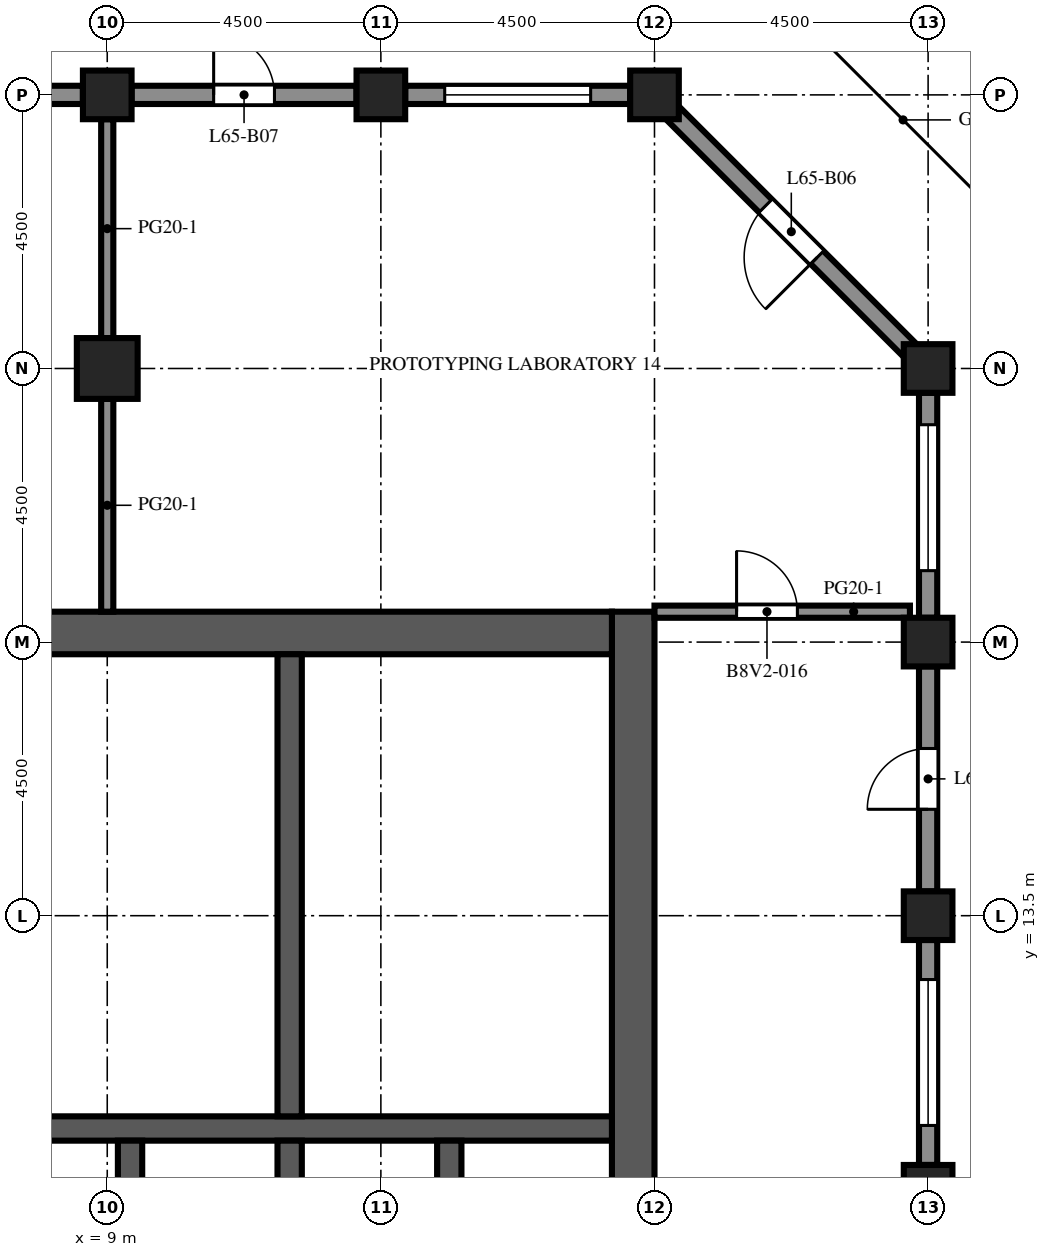
"""IFC4 building model, lengths in metres.
Left out: names, types, materials, properties, quantities, classifications, styles, units other than length and angle.
Written with IfcOpenShell. Run it as: python <this file> out.ifc"""

import sys

from ifc_helpers import new_model, si_unit, direction, frame, frame_2d, origin, origin_2d, place, context, subcontext, project, spatial, rectangle, extrude, element, fill, save


model = new_model("IFC4")
c1 = context("Model", 3, precision=1e-05, world=origin(), true_north=direction((0.0, 1.0)))
c2 = subcontext(c1, "Body", "Model", "MODEL_VIEW")
j1 = project(units=[si_unit("LENGTHUNIT", "METRE"), si_unit("PLANEANGLEUNIT", "RADIAN")], contexts=[c1])
p1 = place(None, origin())
s1 = spatial("IfcSite", under=j1, at=p1, CompositionType="ELEMENT")
p2 = place(p1, origin())
s2 = spatial("IfcBuilding", under=s1, at=p2, CompositionType="ELEMENT")
p3 = place(p2, frame((0.0, 0.0, 286.8)))
s3 = spatial("IfcBuildingStorey", under=s2, at=p3, CompositionType="ELEMENT", Elevation=286.8)
for number, where, z_axis, x_axis in (
    (1, (9.0, 27.0, 0.0), (0.0, 0.0, 1.0), (1.0, 0.0, 0.0)),
    (2, (13.5, 27.0, 0.0), (0.0, 0.0, 1.0), (1.0, 0.0, 0.0)),
    (3, (18.0, 27.0, 0.0), (0.0, 0.0, 1.0), (1.0, 0.0, 0.0)),
    (4, (22.5, 9.0, 0.0), (0.0, 0.0, 1.0), (1.0, 0.0, 0.0)),
    (5, (22.5, 13.5, 0.0), (0.0, 0.0, 1.0), (1.0, 0.0, 0.0)),
    (6, (22.5, 18.0, 0.0), (0.0, 0.0, 1.0), (1.0, 0.0, 0.0)),
    (7, (22.5, 22.5, 0.0), (0.0, 0.0, 1.0), (1.0, 0.0, 0.0)),
):
    element("IfcColumn", number, at=place(p3, frame(where, z_axis=z_axis, x_axis=x_axis)), inside=s3, PredefinedType="COLUMN", context=c2, shape_type="SweptSolid", body=[
        extrude(rectangle(XDim=0.8, YDim=0.8, at=origin_2d()), origin(), (0.0, 0.0, 1.0), 4.1),
    ])
p4 = place(p3, frame((9.0, 22.5, 0.0), z_axis=(0.0, 0.0, 1.0), x_axis=(1.0, 0.0, 0.0)))
e8 = element("IfcColumn", 8, at=p4, inside=s3, PredefinedType="COLUMN", context=c2, shape_type="SweptSolid", body=[
    extrude(rectangle(XDim=1.0, YDim=1.0, at=origin_2d()), origin(), (0.0, 0.0, 1.0), 4.1),
])
p5 = place(p3, frame((17.65, -9.0, 0.0), z_axis=(0.0, 0.0, 1.0), x_axis=(0.0, 1.0, 0.0)))
e9 = element("IfcWall", 9, at=p5, inside=s3, PredefinedType="SHEAR", context=c2, shape_type="SweptSolid", body=[
    extrude(rectangle(XDim=27.5, YDim=0.7, at=frame_2d((13.75, 0.0))), origin(), (0.0, 0.0, 1.0), 4.1),
])
p6 = place(p5, frame((12.55, 0.0, 0.0)))
e10 = element("IfcOpeningElement", 10, at=p6, cuts=e9, PredefinedType="OPENING", context=c2, shape_type="SweptSolid", body=[
    extrude(rectangle(XDim=2.4, YDim=2.4, at=frame_2d((1.2, 1.2))), frame((0.0, 0.36, 0.0), z_axis=(0.0, -1.0, 0.0), x_axis=(1.0, 0.0, 0.0)), (0.0, 0.0, 1.0), 0.72),
])
p7 = place(p5, frame((6.825, 0.0, 0.0)))
e11 = element("IfcOpeningElement", 11, at=p7, cuts=e9, PredefinedType="OPENING", context=c2, shape_type="SweptSolid", body=[
    extrude(rectangle(XDim=1.2, YDim=2.1, at=frame_2d((0.6, 1.05))), frame((0.0, 0.36, 0.0), z_axis=(0.0, -1.0, 0.0), x_axis=(1.0, 0.0, 0.0)), (0.0, 0.0, 1.0), 0.72),
])
p8 = place(p5, frame((19.475, 0.0, 0.0)))
e12 = element("IfcOpeningElement", 12, at=p8, cuts=e9, PredefinedType="OPENING", context=c2, shape_type="SweptSolid", body=[
    extrude(rectangle(XDim=1.2, YDim=2.1, at=frame_2d((0.6, 1.05))), frame((0.0, 0.36, 0.0), z_axis=(0.0, -1.0, 0.0), x_axis=(1.0, 0.0, 0.0)), (0.0, 0.0, 1.0), 0.72),
])
p9 = place(p3, frame((6.7, 18.15, 0.0), z_axis=(0.0, 0.0, 1.0), x_axis=(1.0, 0.0, 0.0)))
e13 = element("IfcWall", 13, at=p9, inside=s3, PredefinedType="SHEAR", context=c2, shape_type="SweptSolid", body=[
    extrude(rectangle(XDim=10.6, YDim=0.7, at=frame_2d((5.3, 0.0))), origin(), (0.0, 0.0, 1.0), 4.1),
])
p10 = place(p3, frame((6.7, 10.0, 0.0), z_axis=(0.0, 0.0, 1.0), x_axis=(1.0, 0.0, 0.0)))
e14 = element("IfcWall", 14, at=p10, inside=s3, PredefinedType="SHEAR", context=c2, shape_type="SweptSolid", body=[
    extrude(rectangle(XDim=10.6, YDim=0.4, at=frame_2d((5.3, 0.0))), origin(), (0.0, 0.0, 1.0), 4.1),
])
for number, where, z_axis, x_axis in (
    (15, (9.375, 6.9, 0.0), (0.0, 0.0, 1.0), (0.0, 1.0, 0.0)),
    (16, (12.0, 6.9, 0.0), (0.0, 0.0, 1.0), (0.0, 1.0, 0.0)),
    (17, (14.625, 6.9, 0.0), (0.0, 0.0, 1.0), (0.0, 1.0, 0.0)),
):
    element("IfcWall", number, at=place(p3, frame(where, z_axis=z_axis, x_axis=x_axis)), inside=s3, PredefinedType="SHEAR", context=c2, shape_type="SweptSolid", body=[
        extrude(rectangle(XDim=2.9, YDim=0.4, at=frame_2d((1.45, 0.0))), origin(), (0.0, 0.0, 1.0), 4.1),
    ])
p11 = place(p3, frame((12.0, 10.2, 0.0), z_axis=(0.0, 0.0, 1.0), x_axis=(0.0, 1.0, 0.0)))
e18 = element("IfcWall", 18, at=p11, inside=s3, PredefinedType="SHEAR", context=c2, shape_type="SweptSolid", body=[
    extrude(rectangle(XDim=7.6, YDim=0.4, at=frame_2d((3.8, 0.0))), origin(), (0.0, 0.0, 1.0), 4.1),
])
p12 = place(p3, frame((22.5, 13.1, 0.0), z_axis=(0.0, 0.0, 1.0), x_axis=(0.0, -1.0, 0.0)))
e19 = element("IfcWall", 19, at=p12, inside=s3, PredefinedType="SOLIDWALL", context=c2, shape_type="SweptSolid", body=[
    extrude(rectangle(XDim=3.7, YDim=0.3, at=frame_2d((1.85, 0.0))), origin(), (0.0, 0.0, 1.0), 2.85),
])
p13 = place(p12, frame((0.65, 0.0, 0.8)))
e20 = element("IfcOpeningElement", 20, at=p13, cuts=e19, PredefinedType="OPENING", context=c2, shape_type="SweptSolid", body=[
    extrude(rectangle(XDim=2.4, YDim=1.7, at=frame_2d((1.2, 0.85))), frame((0.0, 0.16, 0.0), z_axis=(0.0, -1.0, 0.0), x_axis=(1.0, 0.0, 0.0)), (0.0, 0.0, 1.0), 0.32),
])
p14 = place(p3, frame((22.5, 17.6, 0.0), z_axis=(0.0, 0.0, 1.0), x_axis=(0.0, -1.0, 0.0)))
e21 = element("IfcWall", 21, at=p14, inside=s3, PredefinedType="SOLIDWALL", context=c2, shape_type="SweptSolid", body=[
    extrude(rectangle(XDim=3.7, YDim=0.3, at=frame_2d((1.85, 0.0))), origin(), (0.0, 0.0, 1.0), 2.85),
])
p15 = place(p14, frame((1.35, 0.0, 0.0)))
e22 = element("IfcOpeningElement", 22, at=p15, cuts=e21, PredefinedType="OPENING", context=c2, shape_type="SweptSolid", body=[
    extrude(rectangle(XDim=1.0, YDim=2.2, at=frame_2d((0.5, 1.1))), frame((0.0, 0.16, 0.0), z_axis=(0.0, -1.0, 0.0), x_axis=(1.0, 0.0, 0.0)), (0.0, 0.0, 1.0), 0.32),
])
p16 = place(p3, frame((22.5, 22.1, 0.0), z_axis=(0.0, 0.0, 1.0), x_axis=(0.0, -1.0, 0.0)))
e23 = element("IfcWall", 23, at=p16, inside=s3, PredefinedType="SOLIDWALL", context=c2, shape_type="SweptSolid", body=[
    extrude(rectangle(XDim=3.7, YDim=0.3, at=frame_2d((1.85, 0.0))), origin(), (0.0, 0.0, 1.0), 2.85),
])
p17 = place(p16, frame((0.525, 0.0, 0.8)))
e24 = element("IfcOpeningElement", 24, at=p17, cuts=e23, PredefinedType="OPENING", context=c2, shape_type="SweptSolid", body=[
    extrude(rectangle(XDim=2.4, YDim=1.7, at=frame_2d((1.2, 0.85))), frame((0.0, 0.16, 0.0), z_axis=(0.0, -1.0, 0.0), x_axis=(1.0, 0.0, 0.0)), (0.0, 0.0, 1.0), 0.32),
])
p18 = place(p3, frame((18.294, 26.706, 0.0), z_axis=(0.0, 0.0, 1.0), x_axis=(0.707106781187, -0.707106781187, 0.0)))
e25 = element("IfcWall", 25, at=p18, inside=s3, PredefinedType="SOLIDWALL", context=c2, shape_type="SweptSolid", body=[
    extrude(rectangle(XDim=5.532, YDim=0.3, at=frame_2d((2.766, 0.0))), origin(), (0.0, 0.0, 1.0), 2.85),
])
p19 = place(p18, frame((2.166, 0.0, 0.0)))
e26 = element("IfcOpeningElement", 26, at=p19, cuts=e25, PredefinedType="OPENING", context=c2, shape_type="SweptSolid", body=[
    extrude(rectangle(XDim=1.2, YDim=2.2, at=frame_2d((0.6, 1.1))), frame((0.0, 0.16, 0.0), z_axis=(0.0, -1.0, 0.0), x_axis=(1.0, 0.0, 0.0)), (0.0, 0.0, 1.0), 0.32),
])
p20 = place(p3, frame((13.9, 27.0, 0.0), z_axis=(0.0, 0.0, 1.0), x_axis=(1.0, 0.0, 0.0)))
e27 = element("IfcWall", 27, at=p20, inside=s3, PredefinedType="SOLIDWALL", context=c2, shape_type="SweptSolid", body=[
    extrude(rectangle(XDim=3.7, YDim=0.3, at=frame_2d((1.85, 0.0))), origin(), (0.0, 0.0, 1.0), 2.85),
])
p21 = place(p20, frame((0.65, 0.0, 0.8)))
e28 = element("IfcOpeningElement", 28, at=p21, cuts=e27, PredefinedType="OPENING", context=c2, shape_type="SweptSolid", body=[
    extrude(rectangle(XDim=2.4, YDim=1.7, at=frame_2d((1.2, 0.85))), frame((0.0, 0.16, 0.0), z_axis=(0.0, -1.0, 0.0), x_axis=(1.0, 0.0, 0.0)), (0.0, 0.0, 1.0), 0.32),
])
p22 = place(p3, frame((9.4, 27.0, 0.0), z_axis=(0.0, 0.0, 1.0), x_axis=(1.0, 0.0, 0.0)))
e29 = element("IfcWall", 29, at=p22, inside=s3, PredefinedType="SOLIDWALL", context=c2, shape_type="SweptSolid", body=[
    extrude(rectangle(XDim=3.7, YDim=0.3, at=frame_2d((1.85, 0.0))), origin(), (0.0, 0.0, 1.0), 2.85),
])
p23 = place(p22, frame((1.35, 0.0, 0.0)))
e30 = element("IfcOpeningElement", 30, at=p23, cuts=e29, PredefinedType="OPENING", context=c2, shape_type="SweptSolid", body=[
    extrude(rectangle(XDim=1.0, YDim=2.2, at=frame_2d((0.5, 1.1))), frame((0.0, 0.16, 0.0), z_axis=(0.0, -1.0, 0.0), x_axis=(1.0, 0.0, 0.0)), (0.0, 0.0, 1.0), 0.32),
])
p24 = place(p3, frame((4.9, 27.0, 0.0), z_axis=(0.0, 0.0, 1.0), x_axis=(1.0, 0.0, 0.0)))
e31 = element("IfcWall", 31, at=p24, inside=s3, PredefinedType="SOLIDWALL", context=c2, shape_type="SweptSolid", body=[
    extrude(rectangle(XDim=3.7, YDim=0.3, at=frame_2d((1.85, 0.0))), origin(), (0.0, 0.0, 1.0), 2.85),
])
p25 = place(p24, frame((0.65, 0.0, 0.8)))
e32 = element("IfcOpeningElement", 32, at=p25, cuts=e31, PredefinedType="OPENING", context=c2, shape_type="SweptSolid", body=[
    extrude(rectangle(XDim=2.4, YDim=1.7, at=frame_2d((1.2, 0.85))), frame((0.0, 0.16, 0.0), z_axis=(0.0, -1.0, 0.0), x_axis=(1.0, 0.0, 0.0)), (0.0, 0.0, 1.0), 0.32),
])
p26 = place(p3, frame((8.1, 10.2, 0.0), z_axis=(0.0, 0.0, 1.0), x_axis=(0.0, 1.0, 0.0)))
e33 = element("IfcWall", 33, at=p26, inside=s3, PredefinedType="PARTITIONING", context=c2, shape_type="SweptSolid", body=[
    extrude(rectangle(XDim=2.28, YDim=0.1, at=frame_2d((1.14, 0.0))), origin(), (0.0, 0.0, 1.0), 3.65),
])
p27 = place(p26, frame((0.64, 0.0, 0.0)))
e34 = element("IfcOpeningElement", 34, at=p27, cuts=e33, PredefinedType="OPENING", context=c2, shape_type="SweptSolid", body=[
    extrude(rectangle(XDim=1.0, YDim=2.1, at=frame_2d((0.5, 1.05))), frame((0.0, 0.06, 0.0), z_axis=(0.0, -1.0, 0.0), x_axis=(1.0, 0.0, 0.0)), (0.0, 0.0, 1.0), 0.12),
])
p28 = place(p3, frame((8.1, 12.48, 0.0), z_axis=(0.0, 0.0, 1.0), x_axis=(0.0, 1.0, 0.0)))
e35 = element("IfcWall", 35, at=p28, inside=s3, PredefinedType="PARTITIONING", context=c2, shape_type="SweptSolid", body=[
    extrude(rectangle(XDim=2.432, YDim=0.1, at=frame_2d((1.216, 0.0))), origin(), (0.0, 0.0, 1.0), 3.65),
])
p29 = place(p28, frame((0.716, 0.0, 0.0)))
e36 = element("IfcOpeningElement", 36, at=p29, cuts=e35, PredefinedType="OPENING", context=c2, shape_type="SweptSolid", body=[
    extrude(rectangle(XDim=1.0, YDim=2.1, at=frame_2d((0.5, 1.05))), frame((0.0, 0.06, 0.0), z_axis=(0.0, -1.0, 0.0), x_axis=(1.0, 0.0, 0.0)), (0.0, 0.0, 1.0), 0.12),
])
p30 = place(p3, frame((8.1, 14.912, 0.0), z_axis=(0.0, 0.0, 1.0), x_axis=(0.0, 1.0, 0.0)))
e37 = element("IfcWall", 37, at=p30, inside=s3, PredefinedType="PARTITIONING", context=c2, shape_type="SweptSolid", body=[
    extrude(rectangle(XDim=2.888, YDim=0.1, at=frame_2d((1.444, 0.0))), origin(), (0.0, 0.0, 1.0), 3.65),
])
p31 = place(p30, frame((0.944, 0.0, 0.0)))
e38 = element("IfcOpeningElement", 38, at=p31, cuts=e37, PredefinedType="OPENING", context=c2, shape_type="SweptSolid", body=[
    extrude(rectangle(XDim=1.0, YDim=2.1, at=frame_2d((0.5, 1.05))), frame((0.0, 0.06, 0.0), z_axis=(0.0, -1.0, 0.0), x_axis=(1.0, 0.0, 0.0)), (0.0, 0.0, 1.0), 0.12),
])
for number, where, z_axis, x_axis in (
    (39, (8.1, 12.48, 0.0), (0.0, 0.0, 1.0), (1.0, 0.0, 0.0)),
    (40, (8.1, 14.912, 0.0), (0.0, 0.0, 1.0), (1.0, 0.0, 0.0)),
):
    element("IfcWall", number, at=place(p3, frame(where, z_axis=z_axis, x_axis=x_axis)), inside=s3, PredefinedType="PARTITIONING", context=c2, shape_type="SweptSolid", body=[
        extrude(rectangle(XDim=3.7, YDim=0.1, at=frame_2d((1.85, 0.0))), origin(), (0.0, 0.0, 1.0), 3.65),
    ])
p32 = place(p3, frame((9.0, 18.5, 0.0), z_axis=(0.0, 0.0, 1.0), x_axis=(0.0, 1.0, 0.0)))
e41 = element("IfcWall", 41, at=p32, inside=s3, PredefinedType="PARTITIONING", context=c2, shape_type="SweptSolid", body=[
    extrude(rectangle(XDim=3.5, YDim=0.2, at=frame_2d((1.75, 0.0))), origin(), (0.0, 0.0, 1.0), 3.65),
])
p33 = place(p3, frame((9.0, 23.0, 0.0), z_axis=(0.0, 0.0, 1.0), x_axis=(0.0, 1.0, 0.0)))
e42 = element("IfcWall", 42, at=p33, inside=s3, PredefinedType="PARTITIONING", context=c2, shape_type="SweptSolid", body=[
    extrude(rectangle(XDim=3.6, YDim=0.2, at=frame_2d((1.8, 0.0))), origin(), (0.0, 0.0, 1.0), 3.65),
])
p34 = place(p3, frame((18.0, 18.5, 0.0), z_axis=(0.0, 0.0, 1.0), x_axis=(1.0, 0.0, 0.0)))
e43 = element("IfcWall", 43, at=p34, inside=s3, PredefinedType="PARTITIONING", context=c2, shape_type="SweptSolid", body=[
    extrude(rectangle(XDim=4.201, YDim=0.2, at=frame_2d((2.101, 0.0))), origin(), (0.0, 0.0, 1.0), 3.65),
])
p35 = place(p34, frame((1.35, 0.0, 0.0)))
e44 = element("IfcOpeningElement", 44, at=p35, cuts=e43, PredefinedType="OPENING", context=c2, shape_type="SweptSolid", body=[
    extrude(rectangle(XDim=1.0, YDim=2.1, at=frame_2d((0.5, 1.05))), frame((0.0, 0.11, 0.0), z_axis=(0.0, -1.0, 0.0), x_axis=(1.0, 0.0, 0.0)), (0.0, 0.0, 1.0), 0.22),
])
p36 = place(p13, origin())
e45 = element("IfcWindow", 45, at=p36, inside=s3, PartitioningType="SINGLE_PANEL", PredefinedType="WINDOW", context=c2, shape_type="SweptSolid", body=[
    extrude(rectangle(XDim=2.4, YDim=1.7, at=frame_2d((1.2, 0.85))), frame((0.0, 0.03, 0.0), z_axis=(0.0, -1.0, 0.0), x_axis=(1.0, 0.0, 0.0)), (0.0, 0.0, 1.0), 0.06),
])
fill(e20, e45)
p37 = place(p15, origin())
e46 = element("IfcDoor", 46, at=p37, inside=s3, OperationType="SINGLE_SWING_RIGHT", PredefinedType="DOOR", context=c2, shape_type="SweptSolid", body=[
    extrude(rectangle(XDim=1.0, YDim=2.2, at=frame_2d((0.5, 1.1))), frame((0.0, 0.025, 0.0), z_axis=(0.0, -1.0, 0.0), x_axis=(1.0, 0.0, 0.0)), (0.0, 0.0, 1.0), 0.05),
])
fill(e22, e46)
p38 = place(p17, origin())
e47 = element("IfcWindow", 47, at=p38, inside=s3, PartitioningType="SINGLE_PANEL", PredefinedType="WINDOW", context=c2, shape_type="SweptSolid", body=[
    extrude(rectangle(XDim=2.4, YDim=1.7, at=frame_2d((1.2, 0.85))), frame((0.0, 0.03, 0.0), z_axis=(0.0, -1.0, 0.0), x_axis=(1.0, 0.0, 0.0)), (0.0, 0.0, 1.0), 0.06),
])
fill(e24, e47)
p39 = place(p19, origin())
e48 = element("IfcDoor", 48, at=p39, inside=s3, OperationType="SINGLE_SWING_RIGHT", PredefinedType="DOOR", context=c2, shape_type="SweptSolid", body=[
    extrude(rectangle(XDim=1.2, YDim=2.2, at=frame_2d((0.6, 1.1))), frame((0.0, 0.025, 0.0), z_axis=(0.0, -1.0, 0.0), x_axis=(1.0, 0.0, 0.0)), (0.0, 0.0, 1.0), 0.05),
])
fill(e26, e48)
p40 = place(p21, origin())
e49 = element("IfcWindow", 49, at=p40, inside=s3, PartitioningType="SINGLE_PANEL", PredefinedType="WINDOW", context=c2, shape_type="SweptSolid", body=[
    extrude(rectangle(XDim=2.4, YDim=1.7, at=frame_2d((1.2, 0.85))), frame((0.0, 0.03, 0.0), z_axis=(0.0, -1.0, 0.0), x_axis=(1.0, 0.0, 0.0)), (0.0, 0.0, 1.0), 0.06),
])
fill(e28, e49)
p41 = place(p23, origin())
e50 = element("IfcDoor", 50, at=p41, inside=s3, OperationType="SINGLE_SWING_LEFT", PredefinedType="DOOR", context=c2, shape_type="SweptSolid", body=[
    extrude(rectangle(XDim=1.0, YDim=2.2, at=frame_2d((0.5, 1.1))), frame((0.0, 0.025, 0.0), z_axis=(0.0, -1.0, 0.0), x_axis=(1.0, 0.0, 0.0)), (0.0, 0.0, 1.0), 0.05),
])
fill(e30, e50)
p42 = place(p8, frame((1.2, 0.0, 0.0), z_axis=(0.0, 0.0, 1.0), x_axis=(-1.0, 0.0, 0.0)))
e51 = element("IfcDoor", 51, at=p42, inside=s3, OperationType="SINGLE_SWING_LEFT", PredefinedType="DOOR", context=c2, shape_type="SweptSolid", body=[
    extrude(rectangle(XDim=1.2, YDim=2.1, at=frame_2d((0.6, 1.05))), frame((0.0, 0.025, 0.0), z_axis=(0.0, -1.0, 0.0), x_axis=(1.0, 0.0, 0.0)), (0.0, 0.0, 1.0), 0.05),
])
fill(e12, e51)
p43 = place(p27, origin())
e52 = element("IfcDoor", 52, at=p43, inside=s3, OperationType="SINGLE_SWING_LEFT", PredefinedType="DOOR", context=c2, shape_type="SweptSolid", body=[
    extrude(rectangle(XDim=1.0, YDim=2.1, at=frame_2d((0.5, 1.05))), frame((0.0, 0.025, 0.0), z_axis=(0.0, -1.0, 0.0), x_axis=(1.0, 0.0, 0.0)), (0.0, 0.0, 1.0), 0.05),
])
fill(e34, e52)
p44 = place(p29, origin())
e53 = element("IfcDoor", 53, at=p44, inside=s3, OperationType="SINGLE_SWING_RIGHT", PredefinedType="DOOR", context=c2, shape_type="SweptSolid", body=[
    extrude(rectangle(XDim=1.0, YDim=2.1, at=frame_2d((0.5, 1.05))), frame((0.0, 0.025, 0.0), z_axis=(0.0, -1.0, 0.0), x_axis=(1.0, 0.0, 0.0)), (0.0, 0.0, 1.0), 0.05),
])
fill(e36, e53)
p45 = place(p31, origin())
e54 = element("IfcDoor", 54, at=p45, inside=s3, OperationType="SINGLE_SWING_LEFT", PredefinedType="DOOR", context=c2, shape_type="SweptSolid", body=[
    extrude(rectangle(XDim=1.0, YDim=2.1, at=frame_2d((0.5, 1.05))), frame((0.0, 0.025, 0.0), z_axis=(0.0, -1.0, 0.0), x_axis=(1.0, 0.0, 0.0)), (0.0, 0.0, 1.0), 0.05),
])
fill(e38, e54)
p46 = place(p35, origin())
e55 = element("IfcDoor", 55, at=p46, inside=s3, OperationType="SINGLE_SWING_LEFT", PredefinedType="DOOR", context=c2, shape_type="SweptSolid", body=[
    extrude(rectangle(XDim=1.0, YDim=2.1, at=frame_2d((0.5, 1.05))), frame((0.0, 0.025, 0.0), z_axis=(0.0, -1.0, 0.0), x_axis=(1.0, 0.0, 0.0)), (0.0, 0.0, 1.0), 0.05),
])
fill(e44, e55)
save(model, sys.argv[1])
